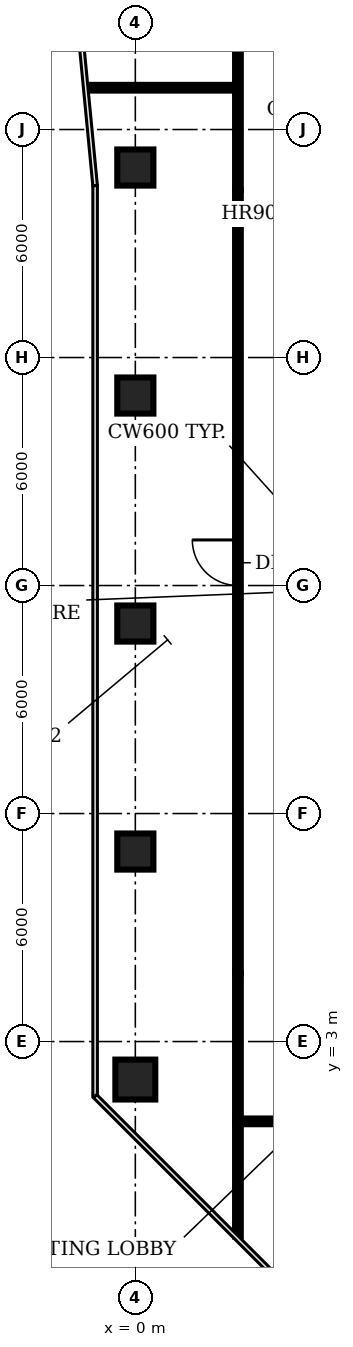
"""IFC4 building model, lengths in metres.
Left out: names, types, materials, properties, quantities, classifications, styles, units other than length and angle.
Written with IfcOpenShell. Run it as: python <this file> out.ifc"""

import sys

from ifc_helpers import new_model, si_unit, direction, frame, frame_2d, origin, origin_2d, place, context, subcontext, project, spatial, rectangle, circle, extrude, element, fill, save


model = new_model("IFC4")
c1 = context("Model", 3, precision=1e-05, world=origin(), true_north=direction((0.0, 1.0)))
c2 = subcontext(c1, "Body", "Model", "MODEL_VIEW")
j1 = project(units=[si_unit("LENGTHUNIT", "METRE"), si_unit("PLANEANGLEUNIT", "RADIAN")], contexts=[c1])
p1 = place(None, origin())
s1 = spatial("IfcSite", under=j1, at=p1, CompositionType="ELEMENT")
p2 = place(p1, origin())
s2 = spatial("IfcBuilding", under=s1, at=p2, CompositionType="ELEMENT")
p3 = place(p2, frame((0.0, 0.0, 192.8)))
s3 = spatial("IfcBuildingStorey", under=s2, at=p3, CompositionType="ELEMENT", Elevation=192.8)
p4 = place(p3, frame((0.0, 2.0, 0.0), z_axis=(0.0, 0.0, 1.0), x_axis=(1.0, 0.0, 0.0)))
e1 = element("IfcColumn", 1, at=p4, inside=s3, PredefinedType="COLUMN", context=c2, shape_type="SweptSolid", body=[
    extrude(circle(Radius=0.525, at=origin_2d()), origin(), (0.0, 0.0, 1.0), 3.2),
])
for number, where, z_axis, x_axis in (
    (2, (0.0, 8.0, 0.0), (0.0, 0.0, 1.0), (1.0, 0.0, 0.0)),
    (3, (0.0, 14.0, 0.0), (0.0, 0.0, 1.0), (1.0, 0.0, 0.0)),
    (4, (0.0, 20.0, 0.0), (0.0, 0.0, 1.0), (1.0, 0.0, 0.0)),
    (5, (0.0, 26.0, 0.0), (0.0, 0.0, 1.0), (1.0, 0.0, 0.0)),
):
    element("IfcColumn", number, at=place(p3, frame(where, z_axis=z_axis, x_axis=x_axis)), inside=s3, PredefinedType="COLUMN", context=c2, shape_type="SweptSolid", body=[
        extrude(rectangle(XDim=0.95, YDim=0.95, at=origin_2d()), origin(), (0.0, 0.0, 1.0), 3.2),
    ])
p5 = place(p3, frame((-1.26, 28.1, 0.0), z_axis=(0.0, 0.0, 1.0), x_axis=(1.0, 0.0, 0.0)))
e6 = element("IfcWall", 6, at=p5, inside=s3, PredefinedType="PARTITIONING", context=c2, shape_type="SweptSolid", body=[
    extrude(rectangle(XDim=3.96, YDim=0.15, at=frame_2d((1.98, 0.0))), origin(), (0.0, 0.0, 1.0), 2.83),
])
p6 = place(p3, frame((2.7, -2.13, 0.0), z_axis=(0.0, 0.0, 1.0), x_axis=(0.0, 1.0, 0.0)))
e7 = element("IfcWall", 7, at=p6, inside=s3, PredefinedType="PARTITIONING", context=c2, shape_type="SweptSolid", body=[
    extrude(rectangle(XDim=3.03, YDim=0.15, at=frame_2d((1.515, 0.0))), origin(), (0.0, 0.0, 1.0), 2.83),
])
p7 = place(p3, frame((2.7, 0.9, 0.0), z_axis=(0.0, 0.0, 1.0), x_axis=(0.0, 1.0, 0.0)))
e8 = element("IfcWall", 8, at=p7, inside=s3, PredefinedType="PARTITIONING", context=c2, shape_type="SweptSolid", body=[
    extrude(rectangle(XDim=3.9, YDim=0.15, at=frame_2d((1.95, 0.0))), origin(), (0.0, 0.0, 1.0), 2.83),
])
p8 = place(p3, frame((2.7, 4.8, 0.0), z_axis=(0.0, 0.0, 1.0), x_axis=(0.0, 1.0, 0.0)))
e9 = element("IfcWall", 9, at=p8, inside=s3, PredefinedType="PARTITIONING", context=c2, shape_type="SweptSolid", body=[
    extrude(rectangle(XDim=20.6, YDim=0.15, at=frame_2d((10.3, 0.0))), origin(), (0.0, 0.0, 1.0), 2.83),
])
p9 = place(p8, frame((10.2, 0.0, 0.0)))
e10 = element("IfcOpeningElement", 10, at=p9, cuts=e9, PredefinedType="OPENING", context=c2, shape_type="SweptSolid", body=[
    extrude(rectangle(XDim=1.2, YDim=2.1, at=frame_2d((0.6, 1.05))), frame((0.0, 0.085, 0.0), z_axis=(0.0, -1.0, 0.0), x_axis=(1.0, 0.0, 0.0)), (0.0, 0.0, 1.0), 0.17),
])
p10 = place(p3, frame((2.7, 25.4, 0.0), z_axis=(0.0, 0.0, 1.0), x_axis=(0.0, 1.0, 0.0)))
e11 = element("IfcWall", 11, at=p10, inside=s3, PredefinedType="PARTITIONING", context=c2, shape_type="SweptSolid", body=[
    extrude(rectangle(XDim=3.9, YDim=0.15, at=frame_2d((1.95, 0.0))), origin(), (0.0, 0.0, 1.0), 2.83),
])
p11 = place(p3, frame((27.3, 0.9, 0.0), z_axis=(0.0, 0.0, 1.0), x_axis=(-1.0, 0.0, 0.0)))
e12 = element("IfcWall", 12, at=p11, inside=s3, PredefinedType="PARTITIONING", context=c2, shape_type="SweptSolid", body=[
    extrude(rectangle(XDim=24.6, YDim=0.15, at=frame_2d((12.3, 0.0))), origin(), (0.0, 0.0, 1.0), 2.83),
])
p12 = place(p11, frame((11.8, 0.0, 0.0)))
e13 = element("IfcOpeningElement", 13, at=p12, cuts=e12, PredefinedType="OPENING", context=c2, shape_type="SweptSolid", body=[
    extrude(rectangle(XDim=1.2, YDim=2.1, at=frame_2d((0.6, 1.05))), frame((0.0, 0.085, 0.0), z_axis=(0.0, -1.0, 0.0), x_axis=(1.0, 0.0, 0.0)), (0.0, 0.0, 1.0), 0.17),
])
p13 = place(p9, origin())
e14 = element("IfcDoor", 14, at=p13, inside=s3, OperationType="SINGLE_SWING_RIGHT", PredefinedType="DOOR", context=c2, shape_type="SweptSolid", body=[
    extrude(rectangle(XDim=1.2, YDim=2.1, at=frame_2d((0.6, 1.05))), frame((0.0, 0.025, 0.0), z_axis=(0.0, -1.0, 0.0), x_axis=(1.0, 0.0, 0.0)), (0.0, 0.0, 1.0), 0.05),
])
fill(e10, e14)
save(model, sys.argv[1])
